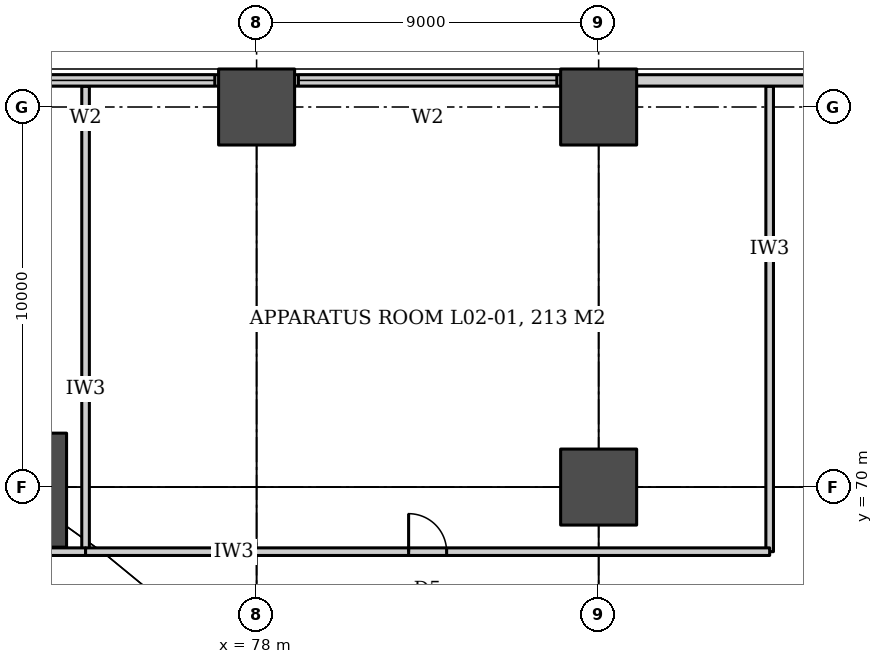
"""IFC4 building model, lengths in metres.
Left out: names, types, materials, properties, quantities, classifications, styles, units other than length and angle.
Written with IfcOpenShell. Run it as: python <this file> out.ifc"""

import sys

from ifc_helpers import new_model, si_unit, direction, frame, frame_2d, origin, origin_2d, place, context, subcontext, project, spatial, rectangle, circle, extrude, element, fill, save


model = new_model("IFC4")
c1 = context("Model", 3, precision=1e-05, world=origin(), true_north=direction((0.0, 1.0)))
c2 = subcontext(c1, "Body", "Model", "MODEL_VIEW")
j1 = project(units=[si_unit("LENGTHUNIT", "METRE"), si_unit("PLANEANGLEUNIT", "RADIAN")], contexts=[c1])
p1 = place(None, origin())
s1 = spatial("IfcSite", under=j1, at=p1, CompositionType="ELEMENT")
p2 = place(p1, origin())
s2 = spatial("IfcBuilding", under=s1, at=p2, CompositionType="ELEMENT")
p3 = place(p2, frame((0.0, 0.0, 15.0)))
s3 = spatial("IfcBuildingStorey", under=s2, at=p3, CompositionType="ELEMENT", Elevation=15.0)
for number, where, z_axis, x_axis in (
    (1, (87.0, 70.0, 0.0), (0.0, 0.0, 1.0), (1.0, 0.0, 0.0)),
    (2, (78.0, 80.0, 0.0), (0.0, 0.0, 1.0), (1.0, 0.0, 0.0)),
    (3, (87.0, 80.0, 0.0), (0.0, 0.0, 1.0), (1.0, 0.0, 0.0)),
):
    element("IfcColumn", number, at=place(p3, frame(where, z_axis=z_axis, x_axis=x_axis)), inside=s3, PredefinedType="COLUMN", context=c2, shape_type="SweptSolid", body=[
        extrude(rectangle(XDim=2.0, YDim=2.0, at=origin_2d()), origin(), (0.0, 0.0, 1.0), 5.0),
    ])
p4 = place(p3, frame((71.5, 69.919, 0.0), z_axis=(0.0, 0.0, 1.0), x_axis=(1.0, 0.0, 0.0)))
e4 = element("IfcColumn", 4, at=p4, inside=s3, PredefinedType="COLUMN", context=c2, shape_type="SweptSolid", body=[
    extrude(circle(Radius=1.5, at=origin_2d()), origin(), (0.0, 0.0, 1.0), 5.0),
])
for number, where, z_axis, x_axis in (
    (5, (73.5, 68.3, 0.0), (0.0, 0.0, 1.0), (0.0, 1.0, 0.0)),
    (6, (91.5, 68.3, 0.0), (0.0, 0.0, 1.0), (0.0, 1.0, 0.0)),
):
    element("IfcWall", number, at=place(p3, frame(where, z_axis=z_axis, x_axis=x_axis)), inside=s3, PredefinedType="PARTITIONING", context=c2, shape_type="SweptSolid", body=[
        extrude(rectangle(XDim=12.245, YDim=0.2, at=frame_2d((6.123, 0.0))), origin(), (0.0, 0.0, 1.0), 2.68),
    ])
p5 = place(p3, frame((46.5, 68.3, 0.0), z_axis=(0.0, 0.0, 1.0), x_axis=(1.0, 0.0, 0.0)))
e7 = element("IfcWall", 7, at=p5, inside=s3, PredefinedType="PARTITIONING", context=c2, shape_type="SweptSolid", body=[
    extrude(rectangle(XDim=27.0, YDim=0.2, at=frame_2d((13.5, 0.0))), origin(), (0.0, 0.0, 1.0), 2.08),
])
p6 = place(p5, frame((13.0, 0.0, 0.0)))
e8 = element("IfcOpeningElement", 8, at=p6, cuts=e7, PredefinedType="OPENING", context=c2, shape_type="SweptSolid", body=[
    extrude(rectangle(XDim=1.0, YDim=2.1, at=frame_2d((0.5, 1.05))), frame((0.0, 0.11, 0.0), z_axis=(0.0, -1.0, 0.0), x_axis=(1.0, 0.0, 0.0)), (0.0, 0.0, 1.0), 0.22),
])
p7 = place(p3, frame((73.5, 68.3, 0.0), z_axis=(0.0, 0.0, 1.0), x_axis=(1.0, 0.0, 0.0)))
e9 = element("IfcWall", 9, at=p7, inside=s3, PredefinedType="PARTITIONING", context=c2, shape_type="SweptSolid", body=[
    extrude(rectangle(XDim=18.0, YDim=0.2, at=frame_2d((9.0, 0.0))), origin(), (0.0, 0.0, 1.0), 2.68),
])
p8 = place(p7, frame((8.5, 0.0, 0.0)))
e10 = element("IfcOpeningElement", 10, at=p8, cuts=e9, PredefinedType="OPENING", context=c2, shape_type="SweptSolid", body=[
    extrude(rectangle(XDim=1.0, YDim=2.1, at=frame_2d((0.5, 1.05))), frame((0.0, 0.11, 0.0), z_axis=(0.0, -1.0, 0.0), x_axis=(1.0, 0.0, 0.0)), (0.0, 0.0, 1.0), 0.22),
])
p9 = place(p3, frame((95.0, 80.7, 0.0), z_axis=(0.0, 0.0, 1.0), x_axis=(-1.0, 0.0, 0.0)))
e11 = element("IfcWall", 11, at=p9, inside=s3, PredefinedType="SOLIDWALL", context=c2, shape_type="SweptSolid", body=[
    extrude(rectangle(XDim=70.0, YDim=0.3, at=frame_2d((35.0, 0.0))), origin(), (0.0, 0.0, 1.0), 4.7),
])
p10 = place(p9, frame((54.1, 0.0, 1.2)))
e12 = element("IfcOpeningElement", 12, at=p10, cuts=e11, PredefinedType="OPENING", context=c2, shape_type="SweptSolid", body=[
    extrude(rectangle(XDim=6.8, YDim=1.5, at=frame_2d((3.4, 0.75))), frame((0.0, 0.16, 0.0), z_axis=(0.0, -1.0, 0.0), x_axis=(1.0, 0.0, 0.0)), (0.0, 0.0, 1.0), 0.32),
])
p11 = place(p9, frame((45.1, 0.0, 1.2)))
e13 = element("IfcOpeningElement", 13, at=p11, cuts=e11, PredefinedType="OPENING", context=c2, shape_type="SweptSolid", body=[
    extrude(rectangle(XDim=6.8, YDim=1.5, at=frame_2d((3.4, 0.75))), frame((0.0, 0.16, 0.0), z_axis=(0.0, -1.0, 0.0), x_axis=(1.0, 0.0, 0.0)), (0.0, 0.0, 1.0), 0.32),
])
p12 = place(p9, frame((36.1, 0.0, 1.2)))
e14 = element("IfcOpeningElement", 14, at=p12, cuts=e11, PredefinedType="OPENING", context=c2, shape_type="SweptSolid", body=[
    extrude(rectangle(XDim=6.8, YDim=1.5, at=frame_2d((3.4, 0.75))), frame((0.0, 0.16, 0.0), z_axis=(0.0, -1.0, 0.0), x_axis=(1.0, 0.0, 0.0)), (0.0, 0.0, 1.0), 0.32),
])
p13 = place(p9, frame((27.1, 0.0, 1.2)))
e15 = element("IfcOpeningElement", 15, at=p13, cuts=e11, PredefinedType="OPENING", context=c2, shape_type="SweptSolid", body=[
    extrude(rectangle(XDim=6.8, YDim=1.5, at=frame_2d((3.4, 0.75))), frame((0.0, 0.16, 0.0), z_axis=(0.0, -1.0, 0.0), x_axis=(1.0, 0.0, 0.0)), (0.0, 0.0, 1.0), 0.32),
])
p14 = place(p9, frame((18.1, 0.0, 1.2)))
e16 = element("IfcOpeningElement", 16, at=p14, cuts=e11, PredefinedType="OPENING", context=c2, shape_type="SweptSolid", body=[
    extrude(rectangle(XDim=6.8, YDim=1.5, at=frame_2d((3.4, 0.75))), frame((0.0, 0.16, 0.0), z_axis=(0.0, -1.0, 0.0), x_axis=(1.0, 0.0, 0.0)), (0.0, 0.0, 1.0), 0.32),
])
p15 = place(p9, frame((9.1, 0.0, 1.2)))
e17 = element("IfcOpeningElement", 17, at=p15, cuts=e11, PredefinedType="OPENING", context=c2, shape_type="SweptSolid", body=[
    extrude(rectangle(XDim=6.8, YDim=1.5, at=frame_2d((3.4, 0.75))), frame((0.0, 0.16, 0.0), z_axis=(0.0, -1.0, 0.0), x_axis=(1.0, 0.0, 0.0)), (0.0, 0.0, 1.0), 0.32),
])
p16 = place(p8, origin())
e18 = element("IfcDoor", 18, at=p16, inside=s3, OperationType="SINGLE_SWING_LEFT", PredefinedType="DOOR", context=c2, shape_type="SweptSolid", body=[
    extrude(rectangle(XDim=1.0, YDim=2.1, at=frame_2d((0.5, 1.05))), frame((0.0, 0.025, 0.0), z_axis=(0.0, -1.0, 0.0), x_axis=(1.0, 0.0, 0.0)), (0.0, 0.0, 1.0), 0.05),
])
fill(e10, e18)
p17 = place(p14, origin())
e19 = element("IfcWindow", 19, at=p17, inside=s3, PartitioningType="SINGLE_PANEL", PredefinedType="WINDOW", context=c2, shape_type="SweptSolid", body=[
    extrude(rectangle(XDim=6.8, YDim=1.5, at=frame_2d((3.4, 0.75))), frame((0.0, 0.03, 0.0), z_axis=(0.0, -1.0, 0.0), x_axis=(1.0, 0.0, 0.0)), (0.0, 0.0, 1.0), 0.06),
])
fill(e16, e19)
p18 = place(p15, origin())
e20 = element("IfcWindow", 20, at=p18, inside=s3, PartitioningType="SINGLE_PANEL", PredefinedType="WINDOW", context=c2, shape_type="SweptSolid", body=[
    extrude(rectangle(XDim=6.8, YDim=1.5, at=frame_2d((3.4, 0.75))), frame((0.0, 0.03, 0.0), z_axis=(0.0, -1.0, 0.0), x_axis=(1.0, 0.0, 0.0)), (0.0, 0.0, 1.0), 0.06),
])
fill(e17, e20)
save(model, sys.argv[1])
